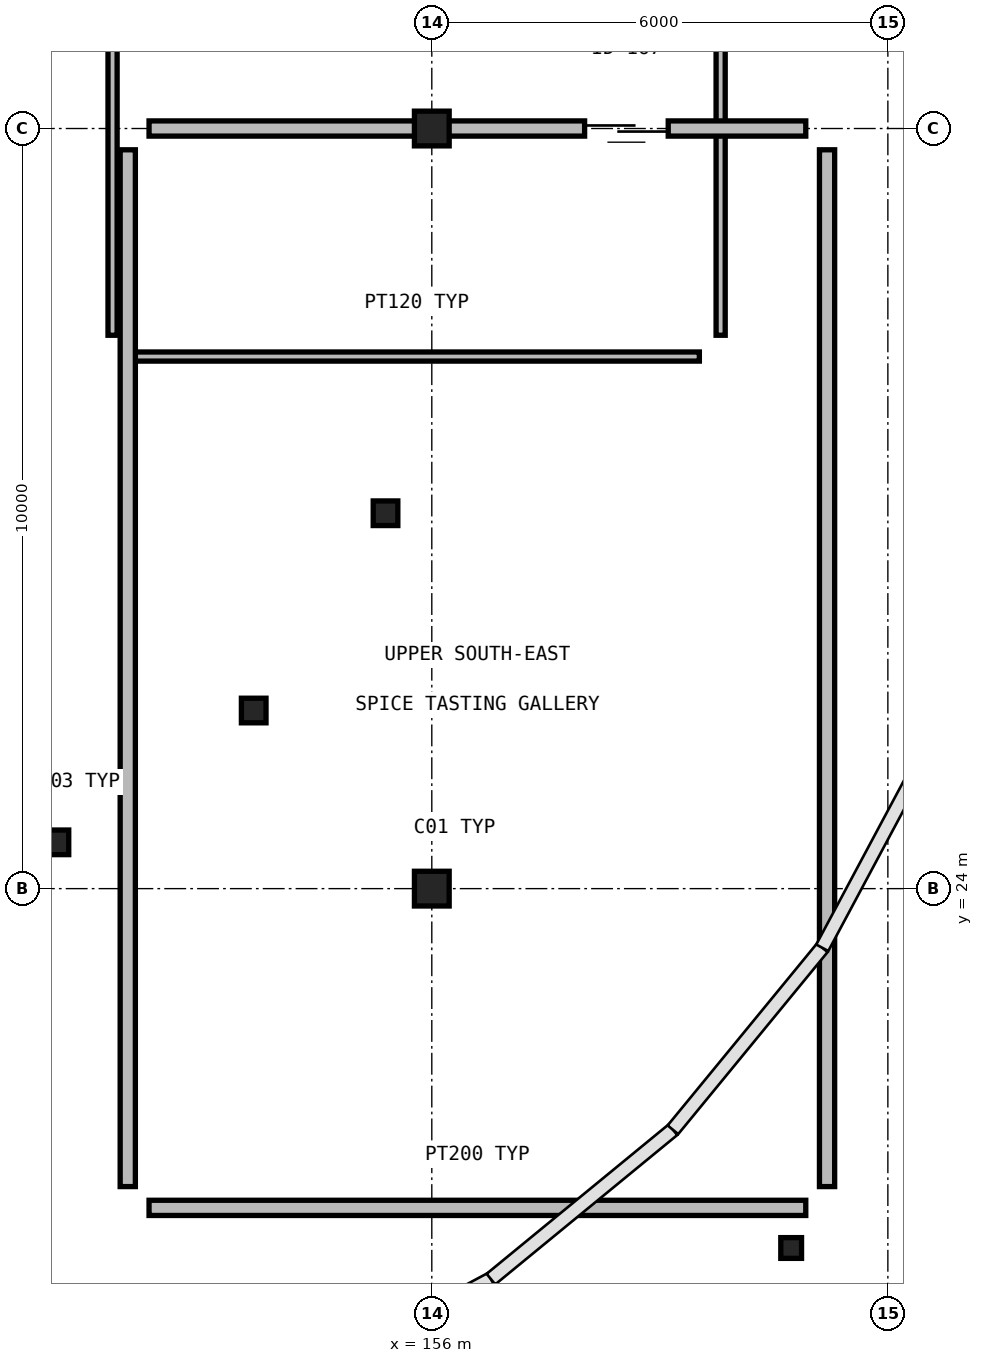
"""IFC4 building model, lengths in metres.
Left out: names, types, materials, properties, quantities, classifications, styles, units other than length and angle.
Written with IfcOpenShell. Run it as: python <this file> out.ifc"""

import sys

from ifc_helpers import new_model, si_unit, direction, frame, frame_2d, origin, origin_2d_with_axis, place, context, subcontext, project, spatial, rectangle, hollow_circle, extrude, element, fill, save


model = new_model("IFC4")
c1 = context("Model", 3, precision=1e-05, world=origin(), true_north=direction((0.0, 1.0)))
c2 = subcontext(c1, "Body", "Model", "MODEL_VIEW")
j1 = project(units=[si_unit("LENGTHUNIT", "METRE"), si_unit("PLANEANGLEUNIT", "RADIAN")], contexts=[c1])
p1 = place(None, origin())
s1 = spatial("IfcSite", under=j1, at=p1, CompositionType="ELEMENT")
p2 = place(p1, origin())
s2 = spatial("IfcBuilding", under=s1, at=p2, CompositionType="ELEMENT")
p3 = place(p2, frame((0.0, 0.0, 8.4)))
s3 = spatial("IfcBuildingStorey", under=s2, at=p3, CompositionType="ELEMENT", Elevation=8.4)
for number, where, z_axis, x_axis in (
    (1, (156.0, 24.0, 0.0), (0.0, 0.0, 1.0), (1.0, 0.0, 0.0)),
    (2, (156.0, 34.0, 0.0), (0.0, 0.0, 1.0), (1.0, 0.0, 0.0)),
):
    element("IfcColumn", number, at=place(p3, frame(where, z_axis=z_axis, x_axis=x_axis)), inside=s3, PredefinedType="COLUMN", context=c2, shape_type="SweptSolid", body=[
        extrude(hollow_circle(Radius=0.229, WallThickness=0.013, at=origin_2d_with_axis()), origin(), (0.0, 0.0, 1.0), 6.0),
    ])
p4 = place(p3, frame((151.062, 24.609, 0.0), z_axis=(0.0, 0.0, 1.0), x_axis=(1.0, 0.0, 0.0)))
e3 = element("IfcColumn", 3, at=p4, inside=s3, PredefinedType="COLUMN", context=c2, shape_type="SweptSolid", body=[
    extrude(hollow_circle(Radius=0.162, WallThickness=0.01, at=origin_2d_with_axis()), origin(), (0.0, 0.0, 1.0), 6.0),
])
p5 = place(p3, frame((160.728, 19.272, 0.0), z_axis=(0.0, 0.0, 1.0), x_axis=(1.0, 0.0, 0.0)))
e4 = element("IfcColumn", 4, at=p5, inside=s3, PredefinedType="COLUMN", context=c2, shape_type="SweptSolid", body=[
    extrude(hollow_circle(Radius=0.136, WallThickness=0.009, at=origin_2d_with_axis()), origin(), (0.0, 0.0, 1.0), 6.0),
])
for number, where, z_axis, x_axis in (
    (5, (153.657, 26.343, 0.0), (0.0, 0.0, 1.0), (1.0, 0.0, 0.0)),
    (6, (155.391, 28.938, 0.0), (0.0, 0.0, 1.0), (1.0, 0.0, 0.0)),
):
    element("IfcColumn", number, at=place(p3, frame(where, z_axis=z_axis, x_axis=x_axis)), inside=s3, PredefinedType="COLUMN", context=c2, shape_type="SweptSolid", body=[
        extrude(hollow_circle(Radius=0.162, WallThickness=0.01, at=origin_2d_with_axis()), origin(), (0.0, 0.0, 1.0), 6.0),
    ])
p6 = place(p3, frame((152.08, 31.0, 0.0), z_axis=(0.0, 0.0, 1.0), x_axis=(1.0, 0.0, 0.0)))
e7 = element("IfcWall", 7, at=p6, inside=s3, PredefinedType="PARTITIONING", context=c2, shape_type="SweptSolid", body=[
    extrude(rectangle(XDim=7.44, YDim=0.12, at=frame_2d((3.72, 0.0), x_axis=(1.0, 0.0))), origin(), (0.0, 0.0, 1.0), 2.74),
])
p7 = place(p3, frame((159.8, 31.28, 0.0), z_axis=(0.0, 0.0, 1.0), x_axis=(0.0, 1.0, 0.0)))
e8 = element("IfcWall", 8, at=p7, inside=s3, PredefinedType="PARTITIONING", context=c2, shape_type="SweptSolid", body=[
    extrude(rectangle(XDim=17.84, YDim=0.12, at=frame_2d((8.92, 0.0), x_axis=(1.0, 0.0))), origin(), (0.0, 0.0, 1.0), 2.74),
])
p8 = place(p3, frame((151.8, 49.12, 0.0), z_axis=(0.0, 0.0, 1.0), x_axis=(0.0, -1.0, 0.0)))
e9 = element("IfcWall", 9, at=p8, inside=s3, PredefinedType="PARTITIONING", context=c2, shape_type="SweptSolid", body=[
    extrude(rectangle(XDim=17.84, YDim=0.12, at=frame_2d((8.92, 0.0), x_axis=(1.0, 0.0))), origin(), (0.0, 0.0, 1.0), 2.74),
])
p9 = place(p8, frame((8.445, 0.0, 0.0)))
e10 = element("IfcOpeningElement", 10, at=p9, cuts=e9, PredefinedType="OPENING", context=c2, shape_type="SweptSolid", body=[
    extrude(rectangle(XDim=0.95, YDim=2.15, at=frame_2d((0.475, 1.075), x_axis=(1.0, 0.0))), frame((0.0, 0.07, 0.0), z_axis=(0.0, -1.0, 0.0), x_axis=(1.0, 0.0, 0.0)), (0.0, 0.0, 1.0), 0.14),
])
p10 = place(p3, frame((152.28, 19.8, 0.0), z_axis=(0.0, 0.0, 1.0), x_axis=(1.0, 0.0, 0.0)))
e11 = element("IfcWall", 11, at=p10, inside=s3, PredefinedType="MOVABLE", context=c2, shape_type="SweptSolid", body=[
    extrude(rectangle(XDim=8.64, YDim=0.2, at=frame_2d((4.32, 0.0), x_axis=(1.0, 0.0))), origin(), (0.0, 0.0, 1.0), 2.74),
])
p11 = place(p3, frame((161.2, 20.08, 0.0), z_axis=(0.0, 0.0, 1.0), x_axis=(0.0, 1.0, 0.0)))
e12 = element("IfcWall", 12, at=p11, inside=s3, PredefinedType="MOVABLE", context=c2, shape_type="SweptSolid", body=[
    extrude(rectangle(XDim=13.64, YDim=0.2, at=frame_2d((6.82, 0.0), x_axis=(1.0, 0.0))), origin(), (0.0, 0.0, 1.0), 2.74),
])
p12 = place(p3, frame((160.92, 34.0, 0.0), z_axis=(0.0, 0.0, 1.0), x_axis=(-1.0, 0.0, 0.0)))
e13 = element("IfcWall", 13, at=p12, inside=s3, PredefinedType="MOVABLE", context=c2, shape_type="SweptSolid", body=[
    extrude(rectangle(XDim=8.64, YDim=0.2, at=frame_2d((4.32, 0.0), x_axis=(1.0, 0.0))), origin(), (0.0, 0.0, 1.0), 2.74),
])
p13 = place(p12, frame((1.81, 0.0, 0.0)))
e14 = element("IfcOpeningElement", 14, at=p13, cuts=e13, PredefinedType="OPENING", context=c2, shape_type="SweptSolid", body=[
    extrude(rectangle(XDim=1.1, YDim=2.15, at=frame_2d((0.55, 1.075), x_axis=(1.0, 0.0))), frame((0.0, 0.11, 0.0), z_axis=(0.0, -1.0, 0.0), x_axis=(1.0, 0.0, 0.0)), (0.0, 0.0, 1.0), 0.22),
])
p14 = place(p3, frame((152.0, 33.72, 0.0), z_axis=(0.0, 0.0, 1.0), x_axis=(0.0, -1.0, 0.0)))
e15 = element("IfcWall", 15, at=p14, inside=s3, PredefinedType="MOVABLE", context=c2, shape_type="SweptSolid", body=[
    extrude(rectangle(XDim=13.64, YDim=0.2, at=frame_2d((6.82, 0.0), x_axis=(1.0, 0.0))), origin(), (0.0, 0.0, 1.0), 2.74),
])
p15 = place(p13, origin())
e16 = element("IfcDoor", 16, at=p15, inside=s3, OperationType="SLIDING_TO_LEFT", PredefinedType="DOOR", context=c2, shape_type="SweptSolid", body=[
    extrude(rectangle(XDim=1.1, YDim=2.15, at=frame_2d((0.55, 1.075), x_axis=(1.0, 0.0))), frame((0.0, 0.025, 0.0), z_axis=(0.0, -1.0, 0.0), x_axis=(1.0, 0.0, 0.0)), (0.0, 0.0, 1.0), 0.05),
])
fill(e14, e16)
save(model, sys.argv[1])
